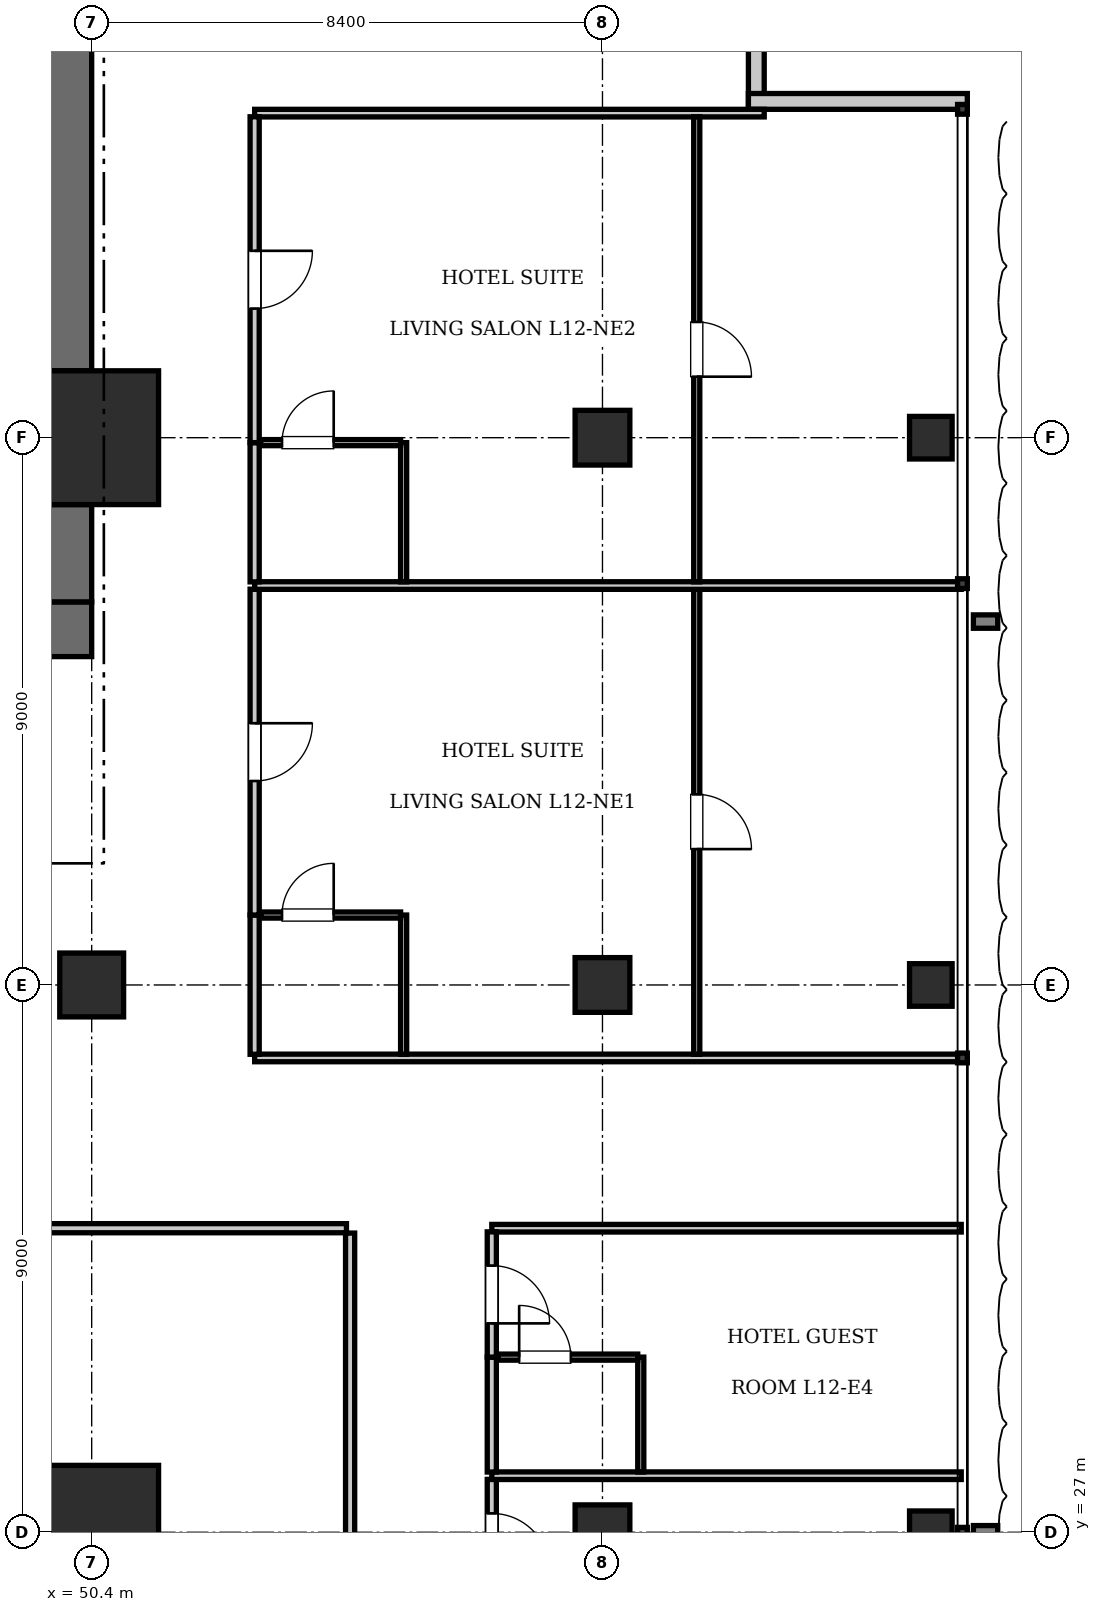
"""IFC4 building model, lengths in metres.
Left out: names, types, materials, properties, quantities, classifications, styles, units other than length and angle.
Written with IfcOpenShell. Run it as: python <this file> out.ifc"""

import sys

from ifc_helpers import new_model, si_unit, direction, frame, frame_2d, origin, origin_2d, place, context, subcontext, project, spatial, rectangle, i_section, extrude, element, fill, save


model = new_model("IFC4")
c1 = context("Model", 3, precision=1e-05, world=origin(), true_north=direction((0.0, 1.0)))
c2 = subcontext(c1, "Body", "Model", "MODEL_VIEW")
j1 = project(units=[si_unit("LENGTHUNIT", "METRE"), si_unit("PLANEANGLEUNIT", "RADIAN")], contexts=[c1])
p1 = place(None, origin())
s1 = spatial("IfcSite", under=j1, at=p1, CompositionType="ELEMENT")
p2 = place(p1, origin())
s2 = spatial("IfcBuilding", under=s1, at=p2, CompositionType="ELEMENT")
p3 = place(p2, frame((0.0, 0.0, 53.9)))
s3 = spatial("IfcBuildingStorey", under=s2, at=p3, CompositionType="ELEMENT", Elevation=53.9)
for number, where, z_axis, x_axis in (
    (1, (50.4, 27.0, 0.0), (0.0, 0.0, 1.0), (1.0, 0.0, 0.0)),
    (2, (50.4, 45.0, 0.0), (0.0, 0.0, 1.0), (1.0, 0.0, 0.0)),
):
    element("IfcColumn", number, at=place(p3, frame(where, z_axis=z_axis, x_axis=x_axis)), inside=s3, PredefinedType="COLUMN", context=c2, shape_type="SweptSolid", body=[
        extrude(rectangle(XDim=2.2, YDim=2.2, at=origin_2d()), origin(), (0.0, 0.0, 1.0), 3.85),
    ])
p4 = place(p3, frame((43.6, 41.85, 0.0), z_axis=(0.0, 0.0, 1.0), x_axis=(1.0, 0.0, 0.0)))
e3 = element("IfcWall", 3, at=p4, inside=s3, PredefinedType="SHEAR", context=c2, shape_type="SweptSolid", body=[
    extrude(rectangle(XDim=6.8, YDim=0.9, at=frame_2d((3.4, 0.0))), origin(), (0.0, 0.0, 1.0), 3.85),
])
p5 = place(p4, frame((3.9, 0.0, 0.0)))
e4 = element("IfcOpeningElement", 4, at=p5, cuts=e3, PredefinedType="OPENING", context=c2, shape_type="SweptSolid", body=[
    extrude(rectangle(XDim=1.15, YDim=2.15, at=frame_2d((0.575, 1.075))), frame((0.0, 0.46, 0.0), z_axis=(0.0, -1.0, 0.0), x_axis=(1.0, 0.0, 0.0)), (0.0, 0.0, 1.0), 0.92),
])
p6 = place(p4, frame((0.55, 0.0, 0.0)))
e5 = element("IfcOpeningElement", 5, at=p6, cuts=e3, PredefinedType="OPENING", context=c2, shape_type="SweptSolid", body=[
    extrude(rectangle(XDim=1.1, YDim=2.2, at=frame_2d((0.55, 1.1))), frame((0.0, 0.46, 0.0), z_axis=(0.0, -1.0, 0.0), x_axis=(1.0, 0.0, 0.0)), (0.0, 0.0, 1.0), 0.92),
])
p7 = place(p3, frame((49.95, 42.3, 0.0), z_axis=(0.0, 0.0, 1.0), x_axis=(0.0, 1.0, 0.0)))
e6 = element("IfcWall", 6, at=p7, inside=s3, PredefinedType="SHEAR", context=c2, shape_type="SweptSolid", body=[
    extrude(rectangle(XDim=1.6, YDim=0.9, at=frame_2d((0.8, 0.0))), origin(), (0.0, 0.0, 1.0), 3.85),
])
p8 = place(p3, frame((49.95, 46.1, 0.0), z_axis=(0.0, 0.0, 1.0), x_axis=(0.0, 1.0, 0.0)))
e7 = element("IfcWall", 7, at=p8, inside=s3, PredefinedType="SHEAR", context=c2, shape_type="SweptSolid", body=[
    extrude(rectangle(XDim=7.0, YDim=0.9, at=frame_2d((3.5, 0.0))), origin(), (0.0, 0.0, 1.0), 3.85),
])
p9 = place(p3, frame((50.4, 36.0, 0.0), z_axis=(0.0, 0.0, 1.0), x_axis=(1.0, 0.0, 0.0)))
e8 = element("IfcColumn", 8, at=p9, inside=s3, PredefinedType="COLUMN", context=c2, shape_type="SweptSolid", body=[
    extrude(rectangle(XDim=1.05, YDim=1.05, at=origin_2d()), origin(), (0.0, 0.0, 1.0), 3.85),
])
for number, where, z_axis, x_axis in (
    (9, (58.8, 27.0, 0.0), (0.0, 0.0, 1.0), (1.0, 0.0, 0.0)),
    (10, (58.8, 36.0, 0.0), (0.0, 0.0, 1.0), (1.0, 0.0, 0.0)),
    (11, (58.8, 45.0, 0.0), (0.0, 0.0, 1.0), (1.0, 0.0, 0.0)),
):
    element("IfcColumn", number, at=place(p3, frame(where, z_axis=z_axis, x_axis=x_axis)), inside=s3, PredefinedType="COLUMN", context=c2, shape_type="SweptSolid", body=[
        extrude(rectangle(XDim=0.9, YDim=0.9, at=origin_2d()), origin(), (0.0, 0.0, 1.0), 3.85),
    ])
for number, where, z_axis, x_axis in (
    (12, (64.2, 27.0, 0.0), (0.0, 0.0, 1.0), (1.0, 0.0, 0.0)),
    (13, (64.2, 36.0, 0.0), (0.0, 0.0, 1.0), (1.0, 0.0, 0.0)),
    (14, (64.2, 45.0, 0.0), (0.0, 0.0, 1.0), (1.0, 0.0, 0.0)),
):
    element("IfcColumn", number, at=place(p3, frame(where, z_axis=z_axis, x_axis=x_axis)), inside=s3, PredefinedType="COLUMN", context=c2, shape_type="SweptSolid", body=[
        extrude(i_section(OverallWidth=0.7, OverallDepth=0.7, WebThickness=0.028, FlangeThickness=0.044, at=origin_2d()), origin(), (0.0, 0.0, 1.0), 3.85),
    ])
for number, where, z_axis, x_axis in (
    (15, (61.33, 54.0, 0.0), (0.0, 0.0, 1.0), (0.0, -1.0, 0.0)),
    (16, (61.2, 50.53, 0.0), (0.0, 0.0, 1.0), (1.0, 0.0, 0.0)),
):
    element("IfcWall", number, at=place(p3, frame(where, z_axis=z_axis, x_axis=x_axis)), inside=s3, PredefinedType="SOLIDWALL", context=c2, shape_type="SweptSolid", body=[
        extrude(rectangle(XDim=3.6, YDim=0.26, at=frame_2d((1.8, 0.0))), origin(), (0.0, 0.0, 1.0), 3.61),
    ])
p10 = place(p3, frame((54.65, 23.98, 0.0), z_axis=(0.0, 0.0, 1.0), x_axis=(0.0, 1.0, 0.0)))
e17 = element("IfcWall", 17, at=p10, inside=s3, PredefinedType="PARTITIONING", context=c2, shape_type="SweptSolid", body=[
    extrude(rectangle(XDim=7.94, YDim=0.15, at=frame_2d((3.97, 0.0))), origin(), (0.0, 0.0, 1.0), 3.255),
])
p11 = place(p3, frame((43.222, 32.0, 0.0), z_axis=(0.0, 0.0, 1.0), x_axis=(1.0, 0.0, 0.0)))
e18 = element("IfcWall", 18, at=p11, inside=s3, PredefinedType="PARTITIONING", context=c2, shape_type="SweptSolid", body=[
    extrude(rectangle(XDim=11.368, YDim=0.15, at=frame_2d((5.684, 0.0))), origin(), (0.0, 0.0, 1.0), 3.61),
])
p12 = place(p11, frame((5.234, 0.0, 0.0)))
e19 = element("IfcOpeningElement", 19, at=p12, cuts=e18, PredefinedType="OPENING", context=c2, shape_type="SweptSolid", body=[
    extrude(rectangle(XDim=0.9, YDim=2.1, at=frame_2d((0.45, 1.05))), frame((0.0, 0.085, 0.0), z_axis=(0.0, -1.0, 0.0), x_axis=(1.0, 0.0, 0.0)), (0.0, 0.0, 1.0), 0.17),
])
p13 = place(p3, frame((56.98, 32.0, 0.0), z_axis=(0.0, 0.0, 1.0), x_axis=(1.0, 0.0, 0.0)))
e20 = element("IfcWall", 20, at=p13, inside=s3, PredefinedType="PARTITIONING", context=c2, shape_type="SweptSolid", body=[
    extrude(rectangle(XDim=7.72, YDim=0.125, at=frame_2d((3.86, 0.0))), origin(), (0.0, 0.0, 1.0), 3.61),
])
p14 = place(p3, frame((56.98, 25.8, 0.0), z_axis=(0.0, 0.0, 1.0), x_axis=(0.0, 1.0, 0.0)))
e21 = element("IfcWall", 21, at=p14, inside=s3, PredefinedType="PARTITIONING", context=c2, shape_type="SweptSolid", body=[
    extrude(rectangle(XDim=2.07, YDim=0.15, at=frame_2d((1.035, 0.0))), origin(), (0.0, 0.0, 1.0), 3.61),
])
p15 = place(p14, frame((0.56, 0.0, 0.0)))
e22 = element("IfcOpeningElement", 22, at=p15, cuts=e21, PredefinedType="OPENING", context=c2, shape_type="SweptSolid", body=[
    extrude(rectangle(XDim=0.95, YDim=2.15, at=frame_2d((0.475, 1.075))), frame((0.0, 0.085, 0.0), z_axis=(0.0, -1.0, 0.0), x_axis=(1.0, 0.0, 0.0)), (0.0, 0.0, 1.0), 0.17),
])
p16 = place(p3, frame((56.98, 27.93, 0.0), z_axis=(0.0, 0.0, 1.0), x_axis=(1.0, 0.0, 0.0)))
e23 = element("IfcWall", 23, at=p16, inside=s3, PredefinedType="PARTITIONING", context=c2, shape_type="SweptSolid", body=[
    extrude(rectangle(XDim=7.72, YDim=0.125, at=frame_2d((3.86, 0.0))), origin(), (0.0, 0.0, 1.0), 3.61),
])
p17 = place(p3, frame((56.98, 27.99, 0.0), z_axis=(0.0, 0.0, 1.0), x_axis=(0.0, 1.0, 0.0)))
e24 = element("IfcWall", 24, at=p17, inside=s3, PredefinedType="PARTITIONING", context=c2, shape_type="SweptSolid", body=[
    extrude(rectangle(XDim=1.89, YDim=0.15, at=frame_2d((0.945, 0.0))), origin(), (0.0, 0.0, 1.0), 3.61),
])
p18 = place(p3, frame((56.98, 29.88, 0.0), z_axis=(0.0, 0.0, 1.0), x_axis=(0.0, 1.0, 0.0)))
e25 = element("IfcWall", 25, at=p18, inside=s3, PredefinedType="PARTITIONING", context=c2, shape_type="SweptSolid", body=[
    extrude(rectangle(XDim=2.06, YDim=0.15, at=frame_2d((1.03, 0.0))), origin(), (0.0, 0.0, 1.0), 3.61),
])
p19 = place(p18, frame((0.555, 0.0, 0.0)))
e26 = element("IfcOpeningElement", 26, at=p19, cuts=e25, PredefinedType="OPENING", context=c2, shape_type="SweptSolid", body=[
    extrude(rectangle(XDim=0.95, YDim=2.15, at=frame_2d((0.475, 1.075))), frame((0.0, 0.085, 0.0), z_axis=(0.0, -1.0, 0.0), x_axis=(1.0, 0.0, 0.0)), (0.0, 0.0, 1.0), 0.17),
])
p20 = place(p3, frame((59.43, 27.99, 0.0), z_axis=(0.0, 0.0, 1.0), x_axis=(0.0, 1.0, 0.0)))
e27 = element("IfcWall", 27, at=p20, inside=s3, PredefinedType="PARTITIONING", context=c2, shape_type="SweptSolid", body=[
    extrude(rectangle(XDim=1.89, YDim=0.1, at=frame_2d((0.945, 0.0))), origin(), (0.0, 0.0, 1.0), 3.61),
])
p21 = place(p3, frame((57.08, 29.88, 0.0), z_axis=(0.0, 0.0, 1.0), x_axis=(1.0, 0.0, 0.0)))
e28 = element("IfcWall", 28, at=p21, inside=s3, PredefinedType="PARTITIONING", context=c2, shape_type="SweptSolid", body=[
    extrude(rectangle(XDim=2.3, YDim=0.1, at=frame_2d((1.15, 0.0))), origin(), (0.0, 0.0, 1.0), 3.61),
])
p22 = place(p21, frame((0.35, 0.0, 0.0)))
e29 = element("IfcOpeningElement", 29, at=p22, cuts=e28, PredefinedType="OPENING", context=c2, shape_type="SweptSolid", body=[
    extrude(rectangle(XDim=0.85, YDim=2.1, at=frame_2d((0.425, 1.05))), frame((0.0, 0.06, 0.0), z_axis=(0.0, -1.0, 0.0), x_axis=(1.0, 0.0, 0.0)), (0.0, 0.0, 1.0), 0.12),
])
p23 = place(p3, frame((53.08, 34.8, 0.0), z_axis=(0.0, 0.0, 1.0), x_axis=(1.0, 0.0, 0.0)))
e30 = element("IfcWall", 30, at=p23, inside=s3, PredefinedType="PARTITIONING", context=c2, shape_type="SweptSolid", body=[
    extrude(rectangle(XDim=11.62, YDim=0.125, at=frame_2d((5.81, 0.0))), origin(), (0.0, 0.0, 1.0), 3.61),
])
p24 = place(p3, frame((53.08, 50.337, 0.0), z_axis=(0.0, 0.0, 1.0), x_axis=(1.0, 0.0, 0.0)))
e31 = element("IfcWall", 31, at=p24, inside=s3, PredefinedType="PARTITIONING", context=c2, shape_type="SweptSolid", body=[
    extrude(rectangle(XDim=8.38, YDim=0.125, at=frame_2d((4.19, 0.0))), origin(), (0.0, 0.0, 1.0), 3.61),
])
p25 = place(p3, frame((53.08, 34.86, 0.0), z_axis=(0.0, 0.0, 1.0), x_axis=(0.0, 1.0, 0.0)))
e32 = element("IfcWall", 32, at=p25, inside=s3, PredefinedType="PARTITIONING", context=c2, shape_type="SweptSolid", body=[
    extrude(rectangle(XDim=2.29, YDim=0.15, at=frame_2d((1.145, 0.0))), origin(), (0.0, 0.0, 1.0), 3.61),
])
p26 = place(p3, frame((53.08, 37.15, 0.0), z_axis=(0.0, 0.0, 1.0), x_axis=(0.0, 1.0, 0.0)))
e33 = element("IfcWall", 33, at=p26, inside=s3, PredefinedType="PARTITIONING", context=c2, shape_type="SweptSolid", body=[
    extrude(rectangle(XDim=5.359, YDim=0.15, at=frame_2d((2.679, 0.0))), origin(), (0.0, 0.0, 1.0), 3.61),
])
p27 = place(p26, frame((2.204, 0.0, 0.0)))
e34 = element("IfcOpeningElement", 34, at=p27, cuts=e33, PredefinedType="OPENING", context=c2, shape_type="SweptSolid", body=[
    extrude(rectangle(XDim=0.95, YDim=2.15, at=frame_2d((0.475, 1.075))), frame((0.0, 0.085, 0.0), z_axis=(0.0, -1.0, 0.0), x_axis=(1.0, 0.0, 0.0)), (0.0, 0.0, 1.0), 0.17),
])
p28 = place(p3, frame((55.53, 34.86, 0.0), z_axis=(0.0, 0.0, 1.0), x_axis=(0.0, 1.0, 0.0)))
e35 = element("IfcWall", 35, at=p28, inside=s3, PredefinedType="PARTITIONING", context=c2, shape_type="SweptSolid", body=[
    extrude(rectangle(XDim=2.29, YDim=0.1, at=frame_2d((1.145, 0.0))), origin(), (0.0, 0.0, 1.0), 3.61),
])
p29 = place(p3, frame((53.18, 37.15, 0.0), z_axis=(0.0, 0.0, 1.0), x_axis=(1.0, 0.0, 0.0)))
e36 = element("IfcWall", 36, at=p29, inside=s3, PredefinedType="PARTITIONING", context=c2, shape_type="SweptSolid", body=[
    extrude(rectangle(XDim=2.3, YDim=0.1, at=frame_2d((1.15, 0.0))), origin(), (0.0, 0.0, 1.0), 3.61),
])
p30 = place(p29, frame((0.35, 0.0, 0.0)))
e37 = element("IfcOpeningElement", 37, at=p30, cuts=e36, PredefinedType="OPENING", context=c2, shape_type="SweptSolid", body=[
    extrude(rectangle(XDim=0.85, YDim=2.1, at=frame_2d((0.425, 1.05))), frame((0.0, 0.06, 0.0), z_axis=(0.0, -1.0, 0.0), x_axis=(1.0, 0.0, 0.0)), (0.0, 0.0, 1.0), 0.12),
])
p31 = place(p3, frame((60.35, 34.86, 0.0), z_axis=(0.0, 0.0, 1.0), x_axis=(0.0, 1.0, 0.0)))
e38 = element("IfcWall", 38, at=p31, inside=s3, PredefinedType="PARTITIONING", context=c2, shape_type="SweptSolid", body=[
    extrude(rectangle(XDim=7.649, YDim=0.1, at=frame_2d((3.824, 0.0))), origin(), (0.0, 0.0, 1.0), 3.61),
])
p32 = place(p31, frame((3.374, 0.0, 0.0)))
e39 = element("IfcOpeningElement", 39, at=p32, cuts=e38, PredefinedType="OPENING", context=c2, shape_type="SweptSolid", body=[
    extrude(rectangle(XDim=0.9, YDim=2.1, at=frame_2d((0.45, 1.05))), frame((0.0, 0.06, 0.0), z_axis=(0.0, -1.0, 0.0), x_axis=(1.0, 0.0, 0.0)), (0.0, 0.0, 1.0), 0.12),
])
p33 = place(p3, frame((53.08, 42.569, 0.0), z_axis=(0.0, 0.0, 1.0), x_axis=(1.0, 0.0, 0.0)))
e40 = element("IfcWall", 40, at=p33, inside=s3, PredefinedType="PARTITIONING", context=c2, shape_type="SweptSolid", body=[
    extrude(rectangle(XDim=11.62, YDim=0.125, at=frame_2d((5.81, 0.0))), origin(), (0.0, 0.0, 1.0), 3.61),
])
p34 = place(p3, frame((53.08, 42.629, 0.0), z_axis=(0.0, 0.0, 1.0), x_axis=(0.0, 1.0, 0.0)))
e41 = element("IfcWall", 41, at=p34, inside=s3, PredefinedType="PARTITIONING", context=c2, shape_type="SweptSolid", body=[
    extrude(rectangle(XDim=2.29, YDim=0.15, at=frame_2d((1.145, 0.0))), origin(), (0.0, 0.0, 1.0), 3.61),
])
p35 = place(p3, frame((53.08, 44.919, 0.0), z_axis=(0.0, 0.0, 1.0), x_axis=(0.0, 1.0, 0.0)))
e42 = element("IfcWall", 42, at=p35, inside=s3, PredefinedType="PARTITIONING", context=c2, shape_type="SweptSolid", body=[
    extrude(rectangle(XDim=5.359, YDim=0.15, at=frame_2d((2.679, 0.0))), origin(), (0.0, 0.0, 1.0), 3.61),
])
p36 = place(p35, frame((2.204, 0.0, 0.0)))
e43 = element("IfcOpeningElement", 43, at=p36, cuts=e42, PredefinedType="OPENING", context=c2, shape_type="SweptSolid", body=[
    extrude(rectangle(XDim=0.95, YDim=2.15, at=frame_2d((0.475, 1.075))), frame((0.0, 0.085, 0.0), z_axis=(0.0, -1.0, 0.0), x_axis=(1.0, 0.0, 0.0)), (0.0, 0.0, 1.0), 0.17),
])
p37 = place(p3, frame((55.53, 42.629, 0.0), z_axis=(0.0, 0.0, 1.0), x_axis=(0.0, 1.0, 0.0)))
e44 = element("IfcWall", 44, at=p37, inside=s3, PredefinedType="PARTITIONING", context=c2, shape_type="SweptSolid", body=[
    extrude(rectangle(XDim=2.29, YDim=0.1, at=frame_2d((1.145, 0.0))), origin(), (0.0, 0.0, 1.0), 3.61),
])
p38 = place(p3, frame((53.18, 44.919, 0.0), z_axis=(0.0, 0.0, 1.0), x_axis=(1.0, 0.0, 0.0)))
e45 = element("IfcWall", 45, at=p38, inside=s3, PredefinedType="PARTITIONING", context=c2, shape_type="SweptSolid", body=[
    extrude(rectangle(XDim=2.3, YDim=0.1, at=frame_2d((1.15, 0.0))), origin(), (0.0, 0.0, 1.0), 2.988),
])
p39 = place(p38, frame((0.35, 0.0, 0.0)))
e46 = element("IfcOpeningElement", 46, at=p39, cuts=e45, PredefinedType="OPENING", context=c2, shape_type="SweptSolid", body=[
    extrude(rectangle(XDim=0.85, YDim=2.1, at=frame_2d((0.425, 1.05))), frame((0.0, 0.06, 0.0), z_axis=(0.0, -1.0, 0.0), x_axis=(1.0, 0.0, 0.0)), (0.0, 0.0, 1.0), 0.12),
])
p40 = place(p3, frame((60.35, 42.629, 0.0), z_axis=(0.0, 0.0, 1.0), x_axis=(0.0, 1.0, 0.0)))
e47 = element("IfcWall", 47, at=p40, inside=s3, PredefinedType="PARTITIONING", context=c2, shape_type="SweptSolid", body=[
    extrude(rectangle(XDim=7.649, YDim=0.1, at=frame_2d((3.824, 0.0))), origin(), (0.0, 0.0, 1.0), 3.61),
])
p41 = place(p40, frame((3.375, 0.0, 0.0)))
e48 = element("IfcOpeningElement", 48, at=p41, cuts=e47, PredefinedType="OPENING", context=c2, shape_type="SweptSolid", body=[
    extrude(rectangle(XDim=0.9, YDim=2.1, at=frame_2d((0.45, 1.05))), frame((0.0, 0.06, 0.0), z_axis=(0.0, -1.0, 0.0), x_axis=(1.0, 0.0, 0.0)), (0.0, 0.0, 1.0), 0.12),
])
p42 = place(p15, frame((0.95, 0.0, 0.0), z_axis=(0.0, 0.0, 1.0), x_axis=(-1.0, 0.0, 0.0)))
e49 = element("IfcDoor", 49, at=p42, inside=s3, OperationType="SINGLE_SWING_RIGHT", PredefinedType="DOOR", context=c2, shape_type="SweptSolid", body=[
    extrude(rectangle(XDim=0.95, YDim=2.15, at=frame_2d((0.475, 1.075))), frame((0.0, 0.025, 0.0), z_axis=(0.0, -1.0, 0.0), x_axis=(1.0, 0.0, 0.0)), (0.0, 0.0, 1.0), 0.05),
])
fill(e22, e49)
p43 = place(p22, origin())
e50 = element("IfcDoor", 50, at=p43, inside=s3, OperationType="SINGLE_SWING_LEFT", PredefinedType="DOOR", context=c2, shape_type="SweptSolid", body=[
    extrude(rectangle(XDim=0.85, YDim=2.1, at=frame_2d((0.425, 1.05))), frame((0.0, 0.025, 0.0), z_axis=(0.0, -1.0, 0.0), x_axis=(1.0, 0.0, 0.0)), (0.0, 0.0, 1.0), 0.05),
])
fill(e29, e50)
p44 = place(p19, frame((0.95, 0.0, 0.0), z_axis=(0.0, 0.0, 1.0), x_axis=(-1.0, 0.0, 0.0)))
e51 = element("IfcDoor", 51, at=p44, inside=s3, OperationType="SINGLE_SWING_RIGHT", PredefinedType="DOOR", context=c2, shape_type="SweptSolid", body=[
    extrude(rectangle(XDim=0.95, YDim=2.15, at=frame_2d((0.475, 1.075))), frame((0.0, 0.025, 0.0), z_axis=(0.0, -1.0, 0.0), x_axis=(1.0, 0.0, 0.0)), (0.0, 0.0, 1.0), 0.05),
])
fill(e26, e51)
p45 = place(p30, origin())
e52 = element("IfcDoor", 52, at=p45, inside=s3, OperationType="SINGLE_SWING_RIGHT", PredefinedType="DOOR", context=c2, shape_type="SweptSolid", body=[
    extrude(rectangle(XDim=0.85, YDim=2.1, at=frame_2d((0.425, 1.05))), frame((0.0, 0.025, 0.0), z_axis=(0.0, -1.0, 0.0), x_axis=(1.0, 0.0, 0.0)), (0.0, 0.0, 1.0), 0.05),
])
fill(e37, e52)
p46 = place(p27, frame((0.95, 0.0, 0.0), z_axis=(0.0, 0.0, 1.0), x_axis=(-1.0, 0.0, 0.0)))
e53 = element("IfcDoor", 53, at=p46, inside=s3, OperationType="SINGLE_SWING_LEFT", PredefinedType="DOOR", context=c2, shape_type="SweptSolid", body=[
    extrude(rectangle(XDim=0.95, YDim=2.15, at=frame_2d((0.475, 1.075))), frame((0.0, 0.025, 0.0), z_axis=(0.0, -1.0, 0.0), x_axis=(1.0, 0.0, 0.0)), (0.0, 0.0, 1.0), 0.05),
])
fill(e34, e53)
p47 = place(p32, frame((0.9, 0.0, 0.0), z_axis=(0.0, 0.0, 1.0), x_axis=(-1.0, 0.0, 0.0)))
e54 = element("IfcDoor", 54, at=p47, inside=s3, OperationType="SINGLE_SWING_RIGHT", PredefinedType="DOOR", context=c2, shape_type="SweptSolid", body=[
    extrude(rectangle(XDim=0.9, YDim=2.1, at=frame_2d((0.45, 1.05))), frame((0.0, 0.025, 0.0), z_axis=(0.0, -1.0, 0.0), x_axis=(1.0, 0.0, 0.0)), (0.0, 0.0, 1.0), 0.05),
])
fill(e39, e54)
p48 = place(p39, origin())
e55 = element("IfcDoor", 55, at=p48, inside=s3, OperationType="SINGLE_SWING_RIGHT", PredefinedType="DOOR", context=c2, shape_type="SweptSolid", body=[
    extrude(rectangle(XDim=0.85, YDim=2.1, at=frame_2d((0.425, 1.05))), frame((0.0, 0.025, 0.0), z_axis=(0.0, -1.0, 0.0), x_axis=(1.0, 0.0, 0.0)), (0.0, 0.0, 1.0), 0.05),
])
fill(e46, e55)
p49 = place(p36, frame((0.95, 0.0, 0.0), z_axis=(0.0, 0.0, 1.0), x_axis=(-1.0, 0.0, 0.0)))
e56 = element("IfcDoor", 56, at=p49, inside=s3, OperationType="SINGLE_SWING_LEFT", PredefinedType="DOOR", context=c2, shape_type="SweptSolid", body=[
    extrude(rectangle(XDim=0.95, YDim=2.15, at=frame_2d((0.475, 1.075))), frame((0.0, 0.025, 0.0), z_axis=(0.0, -1.0, 0.0), x_axis=(1.0, 0.0, 0.0)), (0.0, 0.0, 1.0), 0.05),
])
fill(e43, e56)
p50 = place(p41, frame((0.9, 0.0, 0.0), z_axis=(0.0, 0.0, 1.0), x_axis=(-1.0, 0.0, 0.0)))
e57 = element("IfcDoor", 57, at=p50, inside=s3, OperationType="SINGLE_SWING_RIGHT", PredefinedType="DOOR", context=c2, shape_type="SweptSolid", body=[
    extrude(rectangle(XDim=0.9, YDim=2.1, at=frame_2d((0.45, 1.05))), frame((0.0, 0.025, 0.0), z_axis=(0.0, -1.0, 0.0), x_axis=(1.0, 0.0, 0.0)), (0.0, 0.0, 1.0), 0.05),
])
fill(e48, e57)
save(model, sys.argv[1])
